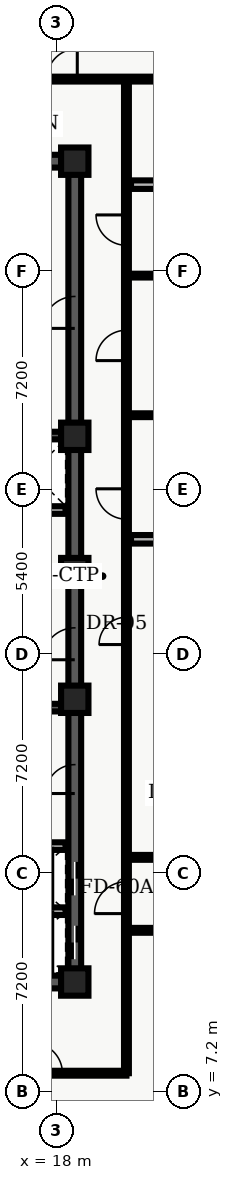
"""IFC4 building model, lengths in metres.
Left out: names, types, materials, properties, quantities, classifications, styles, units other than length and angle.
Written with IfcOpenShell. Run it as: python <this file> out.ifc"""

import sys

from ifc_helpers import new_model, entity, si_unit, converted_unit, direction, frame, origin_with_axes, origin_2d_with_axis, place, context, subcontext, project, spatial, polyline, rectangle, outline, extrude, element, fill, save


model = new_model("IFC4")
c1 = context("Model", 3, precision=1e-05, world=origin_with_axes(), true_north=direction((0.0, 1.0)))
c2 = subcontext(c1, "Body", "Model", "MODEL_VIEW")
j1 = project(units=[si_unit("LENGTHUNIT", "METRE"), converted_unit("PLANEANGLEUNIT", "DEGREE", entity("IfcPlaneAngleMeasure", 0.017), si_unit("PLANEANGLEUNIT", "RADIAN"), dimensions=[0, 0, 0, 0, 0, 0, 0])], contexts=[c1])
p1 = place(None, origin_with_axes())
s1 = spatial("IfcSite", under=j1, at=p1, CompositionType="ELEMENT")
p2 = place(p1, origin_with_axes())
s2 = spatial("IfcBuilding", under=s1, at=p2, CompositionType="ELEMENT")
p3 = place(p2, frame((0.0, 0.0, 232.5), z_axis=(0.0, 0.0, 1.0), x_axis=(1.0, 0.0, 0.0)))
s3 = spatial("IfcBuildingStorey", under=s2, at=p3, CompositionType="ELEMENT", Elevation=232.5)
p4 = place(p3, frame((11.4, 10.8, 0.0), z_axis=(0.0, 0.0, 1.0), x_axis=(1.0, 0.0, 0.0)))
e1 = element("IfcWall", 1, at=p4, inside=s3, PredefinedType="SHEAR", context=c2, shape_type="SweptSolid", body=[
    extrude(outline(polyline([(0.0, -0.21), (7.2, -0.21), (7.2, 0.21), (0.0, 0.21), (0.0, -0.21)])), origin_with_axes(), (0.0, 0.0, 1.0), 3.66),
])
p5 = place(p4, frame((2.625, 0.0, 0.0), z_axis=(0.0, 0.0, 1.0), x_axis=(1.0, 0.0, 0.0)))
e2 = element("IfcOpeningElement", 2, at=p5, cuts=e1, PredefinedType="OPENING", context=c2, shape_type="SweptSolid", body=[
    extrude(rectangle(XDim=1.05, YDim=0.44, at=origin_2d_with_axis()), origin_with_axes(), (0.0, 0.0, 1.0), 2.15),
])
p6 = place(p3, frame((11.4, 37.8, 0.0), z_axis=(0.0, 0.0, 1.0), x_axis=(1.0, 0.0, 0.0)))
e3 = element("IfcWall", 3, at=p6, inside=s3, PredefinedType="SHEAR", context=c2, shape_type="SweptSolid", body=[
    extrude(outline(polyline([(0.0, -0.21), (7.2, -0.21), (7.2, 0.21), (0.0, 0.21), (0.0, -0.21)])), origin_with_axes(), (0.0, 0.0, 1.0), 3.66),
])
p7 = place(p6, frame((2.625, 0.0, 0.0), z_axis=(0.0, 0.0, 1.0), x_axis=(1.0, 0.0, 0.0)))
e4 = element("IfcOpeningElement", 4, at=p7, cuts=e3, PredefinedType="OPENING", context=c2, shape_type="SweptSolid", body=[
    extrude(rectangle(XDim=1.05, YDim=0.44, at=origin_2d_with_axis()), origin_with_axes(), (0.0, 0.0, 1.0), 2.15),
])
p8 = place(p3, frame((18.6, 10.8, 0.0), z_axis=(0.0, 0.0, 1.0), x_axis=(0.0, 1.0, 0.0)))
e5 = element("IfcWall", 5, at=p8, inside=s3, PredefinedType="SHEAR", context=c2, shape_type="SweptSolid", body=[
    extrude(outline(polyline([(0.0, -0.21), (13.5, -0.21), (13.5, 0.21), (0.0, 0.21), (0.0, -0.21)])), origin_with_axes(), (0.0, 0.0, 1.0), 3.66),
])
p9 = place(p8, frame((1.3, 0.0, 0.0), z_axis=(0.0, 0.0, 1.0), x_axis=(1.0, 0.0, 0.0)))
e6 = element("IfcOpeningElement", 6, at=p9, cuts=e5, PredefinedType="OPENING", context=c2, shape_type="SweptSolid", body=[
    extrude(rectangle(XDim=1.1, YDim=0.44, at=origin_2d_with_axis()), origin_with_axes(), (0.0, 0.0, 1.0), 2.15),
])
p10 = place(p8, frame((3.4, 0.0, 0.0), z_axis=(0.0, 0.0, 1.0), x_axis=(1.0, 0.0, 0.0)))
e7 = element("IfcOpeningElement", 7, at=p10, cuts=e5, PredefinedType="OPENING", context=c2, shape_type="SweptSolid", body=[
    extrude(rectangle(XDim=1.1, YDim=0.44, at=origin_2d_with_axis()), origin_with_axes(), (0.0, 0.0, 1.0), 2.15),
])
p11 = place(p8, frame((11.125, 0.0, 0.0), z_axis=(0.0, 0.0, 1.0), x_axis=(1.0, 0.0, 0.0)))
e8 = element("IfcOpeningElement", 8, at=p11, cuts=e5, PredefinedType="OPENING", context=c2, shape_type="SweptSolid", body=[
    extrude(rectangle(XDim=1.05, YDim=0.44, at=origin_2d_with_axis()), origin_with_axes(), (0.0, 0.0, 1.0), 2.15),
])
p12 = place(p8, frame((6.675, 0.0, 0.0), z_axis=(0.0, 0.0, 1.0), x_axis=(1.0, 0.0, 0.0)))
e9 = element("IfcOpeningElement", 9, at=p12, cuts=e5, PredefinedType="OPENING", context=c2, shape_type="SweptSolid", body=[
    extrude(rectangle(XDim=0.95, YDim=0.44, at=origin_2d_with_axis()), origin_with_axes(), (0.0, 0.0, 1.0), 2.15),
])
p13 = place(p3, frame((18.6, 24.3, 0.0), z_axis=(0.0, 0.0, 1.0), x_axis=(0.0, 1.0, 0.0)))
e10 = element("IfcWall", 10, at=p13, inside=s3, PredefinedType="SHEAR", context=c2, shape_type="SweptSolid", body=[
    extrude(outline(polyline([(0.0, -0.21), (13.5, -0.21), (13.5, 0.21), (0.0, 0.21), (0.0, -0.21)])), origin_with_axes(), (0.0, 0.0, 1.0), 3.66),
])
p14 = place(p13, frame((8.525, 0.0, 0.0), z_axis=(0.0, 0.0, 1.0), x_axis=(1.0, 0.0, 0.0)))
e11 = element("IfcOpeningElement", 11, at=p14, cuts=e10, PredefinedType="OPENING", context=c2, shape_type="SweptSolid", body=[
    extrude(rectangle(XDim=1.05, YDim=0.44, at=origin_2d_with_axis()), origin_with_axes(), (0.0, 0.0, 1.0), 2.15),
])
for number, where, z_axis, x_axis in (
    (12, (11.61, 19.825, 0.0), (0.0, 0.0, 1.0), (1.0, 0.0, 0.0)),
    (13, (11.61, 28.775, 0.0), (0.0, 0.0, 1.0), (1.0, 0.0, 0.0)),
):
    element("IfcWall", number, at=place(p3, frame(where, z_axis=z_axis, x_axis=x_axis)), inside=s3, PredefinedType="SHEAR", context=c2, shape_type="SweptSolid", body=[
        extrude(outline(polyline([(0.0, -0.125), (6.78, -0.125), (6.78, 0.125), (0.0, 0.125), (0.0, -0.125)])), origin_with_axes(), (0.0, 0.0, 1.0), 3.66),
    ])
p15 = place(p3, frame((11.7, 24.1, 0.0), z_axis=(0.0, 0.0, 1.0), x_axis=(1.0, 0.0, 0.0)))
e14 = element("IfcWall", 14, at=p15, inside=s3, PredefinedType="SOLIDWALL", context=c2, shape_type="SweptSolid", body=[
    extrude(outline(polyline([(0.0, -0.125), (6.6, -0.125), (6.6, 0.125), (0.0, 0.125), (0.0, -0.125)])), origin_with_axes(), (0.0, 0.0, 1.0), 2.7),
])
p16 = place(p15, frame((3.75, 0.0, 0.0), z_axis=(0.0, 0.0, 1.0), x_axis=(1.0, 0.0, 0.0)))
e15 = element("IfcOpeningElement", 15, at=p16, cuts=e14, PredefinedType="OPENING", context=c2, shape_type="SweptSolid", body=[
    extrude(rectangle(XDim=0.9, YDim=0.27, at=origin_2d_with_axis()), origin_with_axes(), (0.0, 0.0, 1.0), 2.15),
])
p17 = place(p3, frame((11.7, 26.325, 0.0), z_axis=(0.0, 0.0, 1.0), x_axis=(1.0, 0.0, 0.0)))
e16 = element("IfcWall", 16, at=p17, inside=s3, PredefinedType="SOLIDWALL", context=c2, shape_type="SweptSolid", body=[
    extrude(outline(polyline([(0.0, -0.125), (6.6, -0.125), (6.6, 0.125), (0.0, 0.125), (0.0, -0.125)])), origin_with_axes(), (0.0, 0.0, 1.0), 2.7),
])
p18 = place(p17, frame((3.5, 0.0, 0.0), z_axis=(0.0, 0.0, 1.0), x_axis=(1.0, 0.0, 0.0)))
e17 = element("IfcOpeningElement", 17, at=p18, cuts=e16, PredefinedType="OPENING", context=c2, shape_type="SweptSolid", body=[
    extrude(rectangle(XDim=0.9, YDim=0.27, at=origin_2d_with_axis()), origin_with_axes(), (0.0, 0.0, 1.0), 2.15),
])
for number, where, z_axis, x_axis in (
    (18, (18.6, 10.8, 0.0), (0.0, 0.0, 1.0), (1.0, 0.0, 0.0)),
    (19, (18.6, 20.1, 0.0), (0.0, 0.0, 1.0), (1.0, 0.0, 0.0)),
    (20, (18.6, 24.3, 0.0), (0.0, 0.0, 1.0), (1.0, 0.0, 0.0)),
    (21, (18.6, 28.75, 0.0), (0.0, 0.0, 1.0), (1.0, 0.0, 0.0)),
    (22, (18.6, 37.8, 0.0), (0.0, 0.0, 1.0), (1.0, 0.0, 0.0)),
):
    element("IfcColumn", number, at=place(p3, frame(where, z_axis=z_axis, x_axis=x_axis)), inside=s3, PredefinedType="COLUMN", context=c2, shape_type="SweptSolid", body=[
        extrude(rectangle(XDim=0.9, YDim=0.9, at=origin_2d_with_axis()), origin_with_axes(), (0.0, 0.0, 1.0), 3.9),
    ])
for number, where, z_axis, x_axis in (
    (23, (15.84, 13.13, 0.0), (0.0, 0.0, 1.0), (1.0, 0.0, 0.0)),
    (24, (15.84, 15.27, 0.0), (0.0, 0.0, 1.0), (1.0, 0.0, 0.0)),
):
    element("IfcWall", number, at=place(p3, frame(where, z_axis=z_axis, x_axis=x_axis)), inside=s3, PredefinedType="SOLIDWALL", context=c2, shape_type="SweptSolid", body=[
        extrude(outline(polyline([(0.0, -0.125), (2.46, -0.125), (2.46, 0.125), (0.0, 0.125), (0.0, -0.125)])), origin_with_axes(), (0.0, 0.0, 1.0), 2.7),
    ])
p19 = place(p3, frame((7.1, 7.8, 0.0), z_axis=(0.0, 0.0, 1.0), x_axis=(1.0, 0.0, 0.0)))
e25 = element("IfcWall", 25, at=p19, inside=s3, PredefinedType="PARTITIONING", context=c2, shape_type="SweptSolid", body=[
    extrude(outline(polyline([(0.0, -0.08), (13.2, -0.08), (13.2, 0.08), (0.0, 0.08), (0.0, -0.08)])), origin_with_axes(), (0.0, 0.0, 1.0), 2.7),
])
p20 = place(p19, frame((1.885, 0.0, 0.0), z_axis=(0.0, 0.0, 1.0), x_axis=(1.0, 0.0, 0.0)))
e26 = element("IfcOpeningElement", 26, at=p20, cuts=e25, PredefinedType="OPENING", context=c2, shape_type="SweptSolid", body=[
    extrude(rectangle(XDim=1.0, YDim=0.18, at=origin_2d_with_axis()), origin_with_axes(), (0.0, 0.0, 1.0), 2.15),
])
p21 = place(p19, frame((5.909, 0.0, 0.0), z_axis=(0.0, 0.0, 1.0), x_axis=(1.0, 0.0, 0.0)))
e27 = element("IfcOpeningElement", 27, at=p21, cuts=e25, PredefinedType="OPENING", context=c2, shape_type="SweptSolid", body=[
    extrude(rectangle(XDim=1.0, YDim=0.18, at=origin_2d_with_axis()), origin_with_axes(), (0.0, 0.0, 1.0), 2.15),
])
p22 = place(p19, frame((10.594, 0.0, 0.0), z_axis=(0.0, 0.0, 1.0), x_axis=(1.0, 0.0, 0.0)))
e28 = element("IfcOpeningElement", 28, at=p22, cuts=e25, PredefinedType="OPENING", context=c2, shape_type="SweptSolid", body=[
    extrude(rectangle(XDim=1.0, YDim=0.18, at=origin_2d_with_axis()), origin_with_axes(), (0.0, 0.0, 1.0), 2.15),
])
p23 = place(p3, frame((7.1, 40.5, 0.0), z_axis=(0.0, 0.0, 1.0), x_axis=(1.0, 0.0, 0.0)))
e29 = element("IfcWall", 29, at=p23, inside=s3, PredefinedType="PARTITIONING", context=c2, shape_type="SweptSolid", body=[
    extrude(outline(polyline([(0.0, -0.08), (24.965, -0.08), (24.965, 0.08), (0.0, 0.08), (0.0, -0.08)])), origin_with_axes(), (0.0, 0.0, 1.0), 2.7),
])
p24 = place(p23, frame((2.145, 0.0, 0.0), z_axis=(0.0, 0.0, 1.0), x_axis=(1.0, 0.0, 0.0)))
e30 = element("IfcOpeningElement", 30, at=p24, cuts=e29, PredefinedType="OPENING", context=c2, shape_type="SweptSolid", body=[
    extrude(rectangle(XDim=1.0, YDim=0.18, at=origin_2d_with_axis()), origin_with_axes(), (0.0, 0.0, 1.0), 2.15),
])
p25 = place(p23, frame((5.514, 0.0, 0.0), z_axis=(0.0, 0.0, 1.0), x_axis=(1.0, 0.0, 0.0)))
e31 = element("IfcOpeningElement", 31, at=p25, cuts=e29, PredefinedType="OPENING", context=c2, shape_type="SweptSolid", body=[
    extrude(rectangle(XDim=1.0, YDim=0.18, at=origin_2d_with_axis()), origin_with_axes(), (0.0, 0.0, 1.0), 2.15),
])
p26 = place(p23, frame((8.217, 0.0, 0.0), z_axis=(0.0, 0.0, 1.0), x_axis=(1.0, 0.0, 0.0)))
e32 = element("IfcOpeningElement", 32, at=p26, cuts=e29, PredefinedType="OPENING", context=c2, shape_type="SweptSolid", body=[
    extrude(rectangle(XDim=1.0, YDim=0.18, at=origin_2d_with_axis()), origin_with_axes(), (0.0, 0.0, 1.0), 2.15),
])
p27 = place(p23, frame((11.083, 0.0, 0.0), z_axis=(0.0, 0.0, 1.0), x_axis=(1.0, 0.0, 0.0)))
e33 = element("IfcOpeningElement", 33, at=p27, cuts=e29, PredefinedType="OPENING", context=c2, shape_type="SweptSolid", body=[
    extrude(rectangle(XDim=1.0, YDim=0.18, at=origin_2d_with_axis()), origin_with_axes(), (0.0, 0.0, 1.0), 2.15),
])
p28 = place(p3, frame((20.3, 7.8, 0.0), z_axis=(0.0, 0.0, 1.0), x_axis=(0.0, 1.0, 0.0)))
e34 = element("IfcWall", 34, at=p28, inside=s3, PredefinedType="PARTITIONING", context=c2, shape_type="SweptSolid", body=[
    extrude(outline(polyline([(0.0, -0.08), (32.7, -0.08), (32.7, 0.08), (0.0, 0.08), (0.0, -0.08)])), origin_with_axes(), (0.0, 0.0, 1.0), 2.7),
])
p29 = place(p28, frame((14.55, 0.0, 0.0), z_axis=(0.0, 0.0, 1.0), x_axis=(1.0, 0.0, 0.0)))
e35 = element("IfcOpeningElement", 35, at=p29, cuts=e34, PredefinedType="OPENING", context=c2, shape_type="SweptSolid", body=[
    extrude(rectangle(XDim=0.9, YDim=0.18, at=origin_2d_with_axis()), origin_with_axes(), (0.0, 0.0, 1.0), 2.15),
])
p30 = place(p28, frame((18.723, 0.0, 0.0), z_axis=(0.0, 0.0, 1.0), x_axis=(1.0, 0.0, 0.0)))
e36 = element("IfcOpeningElement", 36, at=p30, cuts=e34, PredefinedType="OPENING", context=c2, shape_type="SweptSolid", body=[
    extrude(rectangle(XDim=1.0, YDim=0.18, at=origin_2d_with_axis()), origin_with_axes(), (0.0, 0.0, 1.0), 2.15),
])
p31 = place(p28, frame((23.94, 0.0, 0.0), z_axis=(0.0, 0.0, 1.0), x_axis=(1.0, 0.0, 0.0)))
e37 = element("IfcOpeningElement", 37, at=p31, cuts=e34, PredefinedType="OPENING", context=c2, shape_type="SweptSolid", body=[
    extrude(rectangle(XDim=1.0, YDim=0.18, at=origin_2d_with_axis()), origin_with_axes(), (0.0, 0.0, 1.0), 2.15),
])
p32 = place(p28, frame((27.732, 0.0, 0.0), z_axis=(0.0, 0.0, 1.0), x_axis=(1.0, 0.0, 0.0)))
e38 = element("IfcOpeningElement", 38, at=p32, cuts=e34, PredefinedType="OPENING", context=c2, shape_type="SweptSolid", body=[
    extrude(rectangle(XDim=1.0, YDim=0.18, at=origin_2d_with_axis()), origin_with_axes(), (0.0, 0.0, 1.0), 2.15),
])
p33 = place(p28, frame((5.775, 0.0, 0.0), z_axis=(0.0, 0.0, 1.0), x_axis=(1.0, 0.0, 0.0)))
e39 = element("IfcOpeningElement", 39, at=p33, cuts=e34, PredefinedType="OPENING", context=c2, shape_type="SweptSolid", body=[
    extrude(rectangle(XDim=1.05, YDim=0.18, at=origin_2d_with_axis()), origin_with_axes(), (0.0, 0.0, 1.0), 2.15),
])
p34 = place(p3, frame((20.45, 25.362, 0.0), z_axis=(0.0, 0.0, 1.0), x_axis=(1.0, 0.0, 0.0)))
e40 = element("IfcWall", 40, at=p34, inside=s3, PredefinedType="PARTITIONING", context=c2, shape_type="SweptSolid", body=[
    extrude(outline(polyline([(0.0, -0.14), (11.615, -0.14), (11.615, 0.14), (0.0, 0.14), (0.0, -0.14)])), origin_with_axes(), (0.0, 0.0, 1.0), 2.7),
])
for number, where, z_axis, x_axis in (
    (41, (20.45, 29.444, 0.0), (0.0, 0.0, 1.0), (1.0, 0.0, 0.0)),
    (42, (20.45, 34.036, 0.0), (0.0, 0.0, 1.0), (1.0, 0.0, 0.0)),
):
    element("IfcWall", number, at=place(p3, frame(where, z_axis=z_axis, x_axis=x_axis)), inside=s3, PredefinedType="PARTITIONING", context=c2, shape_type="SweptSolid", body=[
        extrude(outline(polyline([(0.0, -0.062), (11.615, -0.062), (11.615, 0.062), (0.0, 0.062), (0.0, -0.062)])), origin_with_axes(), (0.0, 0.0, 1.0), 2.7),
    ])
p35 = place(p3, frame((20.45, 37.028, 0.0), z_axis=(0.0, 0.0, 1.0), x_axis=(1.0, 0.0, 0.0)))
e43 = element("IfcWall", 43, at=p35, inside=s3, PredefinedType="PARTITIONING", context=c2, shape_type="SweptSolid", body=[
    extrude(outline(polyline([(0.0, -0.14), (11.615, -0.14), (11.615, 0.14), (0.0, 0.14), (0.0, -0.14)])), origin_with_axes(), (0.0, 0.0, 1.0), 2.7),
])
p36 = place(p35, frame((5.785, 0.0, 0.0), z_axis=(0.0, 0.0, 1.0), x_axis=(1.0, 0.0, 0.0)))
e44 = element("IfcOpeningElement", 44, at=p36, cuts=e43, PredefinedType="OPENING", context=c2, shape_type="SweptSolid", body=[
    extrude(rectangle(XDim=0.95, YDim=0.3, at=origin_2d_with_axis()), origin_with_axes(), (0.0, 0.0, 1.0), 2.15),
])
p37 = place(p3, frame((20.3, 12.5, 0.0), z_axis=(0.0, 0.0, 1.0), x_axis=(1.0, 0.0, 0.0)))
e45 = element("IfcWall", 45, at=p37, inside=s3, PredefinedType="PARTITIONING", context=c2, shape_type="SweptSolid", body=[
    extrude(outline(polyline([(0.0, -0.08), (16.05, -0.08), (16.05, 0.08), (0.0, 0.08), (0.0, -0.08)])), origin_with_axes(), (0.0, 0.0, 1.0), 2.7),
])
p38 = place(p37, frame((2.383, 0.0, 0.0), z_axis=(0.0, 0.0, 1.0), x_axis=(1.0, 0.0, 0.0)))
e46 = element("IfcOpeningElement", 46, at=p38, cuts=e45, PredefinedType="OPENING", context=c2, shape_type="SweptSolid", body=[
    extrude(rectangle(XDim=1.2, YDim=0.18, at=origin_2d_with_axis()), origin_with_axes(), (0.0, 0.0, 1.0), 2.2),
])
p39 = place(p37, frame((7.137, 0.0, 0.0), z_axis=(0.0, 0.0, 1.0), x_axis=(1.0, 0.0, 0.0)))
e47 = element("IfcOpeningElement", 47, at=p39, cuts=e45, PredefinedType="OPENING", context=c2, shape_type="SweptSolid", body=[
    extrude(rectangle(XDim=1.0, YDim=0.18, at=origin_2d_with_axis()), origin_with_axes(), (0.0, 0.0, 1.0), 2.15),
])
p40 = place(p37, frame((12.829, 0.0, 0.0), z_axis=(0.0, 0.0, 1.0), x_axis=(1.0, 0.0, 0.0)))
e48 = element("IfcOpeningElement", 48, at=p40, cuts=e45, PredefinedType="OPENING", context=c2, shape_type="SweptSolid", body=[
    extrude(rectangle(XDim=1.0, YDim=0.18, at=origin_2d_with_axis()), origin_with_axes(), (0.0, 0.0, 1.0), 2.15),
])
p41 = place(p3, frame((20.3, 14.9, 0.0), z_axis=(0.0, 0.0, 1.0), x_axis=(1.0, 0.0, 0.0)))
e49 = element("IfcWall", 49, at=p41, inside=s3, PredefinedType="PARTITIONING", context=c2, shape_type="SweptSolid", body=[
    extrude(outline(polyline([(0.0, -0.08), (16.05, -0.08), (16.05, 0.08), (0.0, 0.08), (0.0, -0.08)])), origin_with_axes(), (0.0, 0.0, 1.0), 2.7),
])
p42 = place(p41, frame((8.075, 0.0, 0.0), z_axis=(0.0, 0.0, 1.0), x_axis=(1.0, 0.0, 0.0)))
e50 = element("IfcOpeningElement", 50, at=p42, cuts=e49, PredefinedType="OPENING", context=c2, shape_type="SweptSolid", body=[
    extrude(rectangle(XDim=1.2, YDim=0.18, at=origin_2d_with_axis()), origin_with_axes(), (0.0, 0.0, 1.0), 2.2),
])
p43 = place(p8, frame((1.3, 0.0, 0.0), z_axis=(0.0, 0.0, 1.0), x_axis=(1.0, 0.0, 0.0)))
e51 = element("IfcDoor", 51, at=p43, inside=s3, OperationType="SLIDING_TO_LEFT", PredefinedType="DOOR", context=c2, shape_type="SweptSolid", body=[
    extrude(rectangle(XDim=1.1, YDim=0.09, at=origin_2d_with_axis()), origin_with_axes(), (0.0, 0.0, 1.0), 2.15),
])
fill(e6, e51)
p44 = place(p8, frame((3.4, 0.0, 0.0), z_axis=(0.0, 0.0, 1.0), x_axis=(1.0, 0.0, 0.0)))
e52 = element("IfcDoor", 52, at=p44, inside=s3, OperationType="SLIDING_TO_RIGHT", PredefinedType="DOOR", context=c2, shape_type="SweptSolid", body=[
    extrude(rectangle(XDim=1.1, YDim=0.09, at=origin_2d_with_axis()), origin_with_axes(), (0.0, 0.0, 1.0), 2.15),
])
fill(e7, e52)
p45 = place(p8, frame((11.125, 0.0, 0.0), z_axis=(0.0, 0.0, 1.0), x_axis=(1.0, 0.0, 0.0)))
e53 = element("IfcDoor", 53, at=p45, inside=s3, OperationType="SINGLE_SWING_LEFT", PredefinedType="DOOR", context=c2, shape_type="SweptSolid", body=[
    extrude(rectangle(XDim=1.05, YDim=0.09, at=origin_2d_with_axis()), origin_with_axes(), (0.0, 0.0, 1.0), 2.15),
])
fill(e8, e53)
p46 = place(p8, frame((6.675, 0.0, 0.0), z_axis=(0.0, 0.0, 1.0), x_axis=(1.0, 0.0, 0.0)))
e54 = element("IfcDoor", 54, at=p46, inside=s3, OperationType="SINGLE_SWING_LEFT", PredefinedType="DOOR", context=c2, shape_type="SweptSolid", body=[
    extrude(rectangle(XDim=0.95, YDim=0.09, at=origin_2d_with_axis()), origin_with_axes(), (0.0, 0.0, 1.0), 2.15),
])
fill(e9, e54)
p47 = place(p13, frame((8.525, 0.0, 0.0), z_axis=(0.0, 0.0, 1.0), x_axis=(1.0, 0.0, 0.0)))
e55 = element("IfcDoor", 55, at=p47, inside=s3, OperationType="SINGLE_SWING_LEFT", PredefinedType="DOOR", context=c2, shape_type="SweptSolid", body=[
    extrude(rectangle(XDim=1.05, YDim=0.09, at=origin_2d_with_axis()), origin_with_axes(), (0.0, 0.0, 1.0), 2.15),
])
fill(e11, e55)
p48 = place(p19, frame((10.594, 0.0, 0.0), z_axis=(0.0, 0.0, 1.0), x_axis=(1.0, 0.0, 0.0)))
e56 = element("IfcDoor", 56, at=p48, inside=s3, OperationType="SINGLE_SWING_LEFT", PredefinedType="DOOR", context=c2, shape_type="SweptSolid", body=[
    extrude(rectangle(XDim=1.0, YDim=0.09, at=origin_2d_with_axis()), origin_with_axes(), (0.0, 0.0, 1.0), 2.15),
])
fill(e28, e56)
p49 = place(p23, frame((11.083, 0.0, 0.0), z_axis=(0.0, 0.0, 1.0), x_axis=(1.0, 0.0, 0.0)))
e57 = element("IfcDoor", 57, at=p49, inside=s3, OperationType="SINGLE_SWING_RIGHT", PredefinedType="DOOR", context=c2, shape_type="SweptSolid", body=[
    extrude(rectangle(XDim=1.0, YDim=0.09, at=origin_2d_with_axis()), origin_with_axes(), (0.0, 0.0, 1.0), 2.15),
])
fill(e33, e57)
p50 = place(p28, frame((14.55, 0.0, 0.0), z_axis=(0.0, 0.0, 1.0), x_axis=(1.0, 0.0, 0.0)))
e58 = element("IfcDoor", 58, at=p50, inside=s3, OperationType="SINGLE_SWING_LEFT", PredefinedType="DOOR", context=c2, shape_type="SweptSolid", body=[
    extrude(rectangle(XDim=0.9, YDim=0.09, at=origin_2d_with_axis()), origin_with_axes(), (0.0, 0.0, 1.0), 2.15),
])
fill(e35, e58)
p51 = place(p28, frame((18.723, 0.0, 0.0), z_axis=(0.0, 0.0, 1.0), x_axis=(1.0, 0.0, 0.0)))
e59 = element("IfcDoor", 59, at=p51, inside=s3, OperationType="SINGLE_SWING_RIGHT", PredefinedType="DOOR", context=c2, shape_type="SweptSolid", body=[
    extrude(rectangle(XDim=1.0, YDim=0.09, at=origin_2d_with_axis()), origin_with_axes(), (0.0, 0.0, 1.0), 2.15),
])
fill(e36, e59)
p52 = place(p28, frame((23.94, 0.0, 0.0), z_axis=(0.0, 0.0, 1.0), x_axis=(1.0, 0.0, 0.0)))
e60 = element("IfcDoor", 60, at=p52, inside=s3, OperationType="SINGLE_SWING_LEFT", PredefinedType="DOOR", context=c2, shape_type="SweptSolid", body=[
    extrude(rectangle(XDim=1.0, YDim=0.09, at=origin_2d_with_axis()), origin_with_axes(), (0.0, 0.0, 1.0), 2.15),
])
fill(e37, e60)
p53 = place(p28, frame((27.732, 0.0, 0.0), z_axis=(0.0, 0.0, 1.0), x_axis=(1.0, 0.0, 0.0)))
e61 = element("IfcDoor", 61, at=p53, inside=s3, OperationType="SINGLE_SWING_RIGHT", PredefinedType="DOOR", context=c2, shape_type="SweptSolid", body=[
    extrude(rectangle(XDim=1.0, YDim=0.09, at=origin_2d_with_axis()), origin_with_axes(), (0.0, 0.0, 1.0), 2.15),
])
fill(e38, e61)
p54 = place(p28, frame((5.775, 0.0, 0.0), z_axis=(0.0, 0.0, 1.0), x_axis=(1.0, 0.0, 0.0)))
e62 = element("IfcDoor", 62, at=p54, inside=s3, OperationType="SINGLE_SWING_LEFT", PredefinedType="DOOR", context=c2, shape_type="SweptSolid", body=[
    extrude(rectangle(XDim=1.05, YDim=0.09, at=origin_2d_with_axis()), origin_with_axes(), (0.0, 0.0, 1.0), 2.15),
])
fill(e39, e62)
save(model, sys.argv[1])
